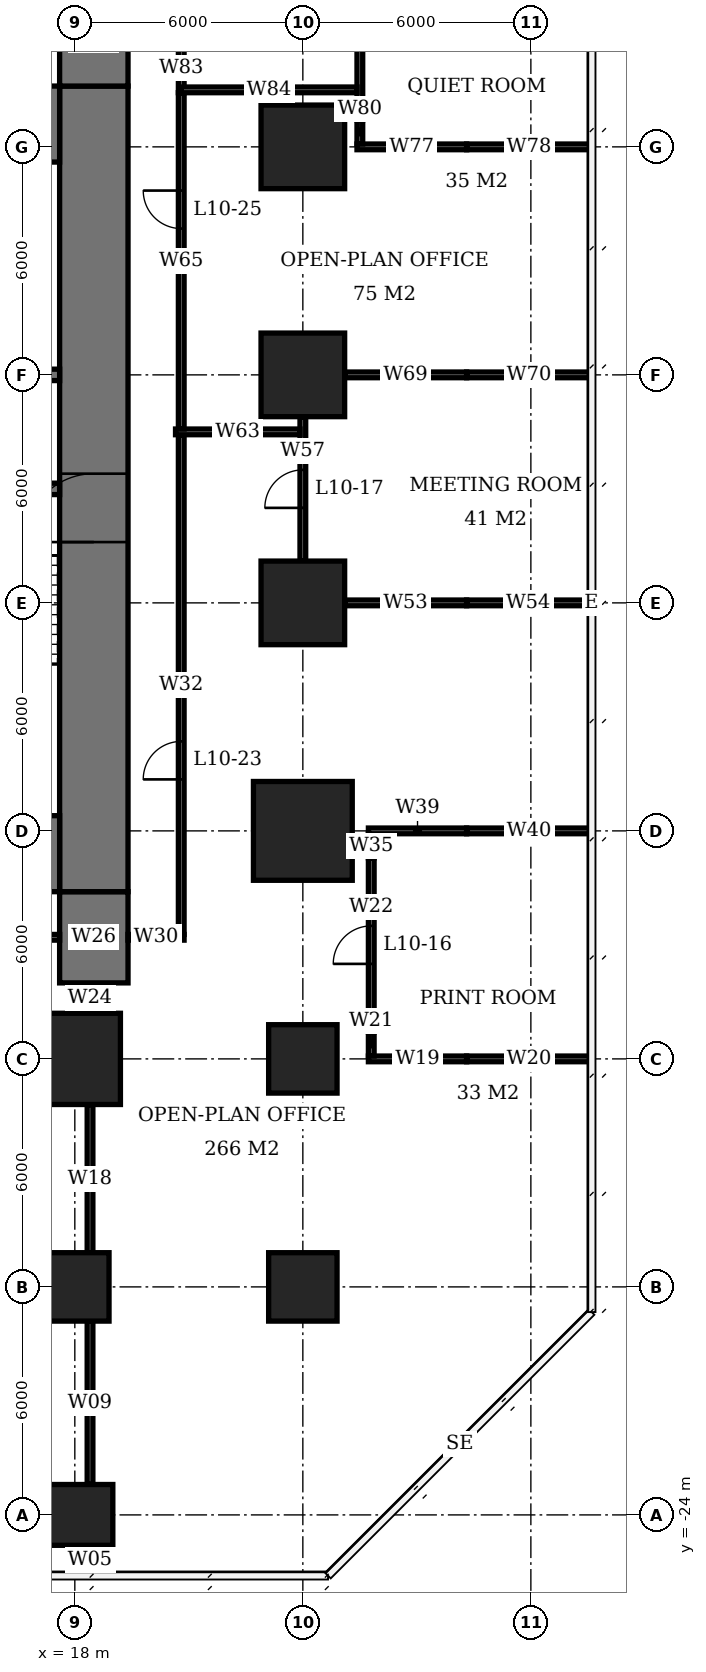
"""IFC4 building model, lengths in metres.
Left out: names, types, materials, properties, quantities, classifications, styles, units other than length and angle.
Written with IfcOpenShell. Run it as: python <this file> out.ifc"""

import sys

from ifc_helpers import new_model, si_unit, direction, frame, frame_2d, origin, origin_2d, place, context, subcontext, project, spatial, rectangle, extrude, element, fill, save


model = new_model("IFC4")
c1 = context("Model", 3, precision=1e-05, world=origin(), true_north=direction((0.0, 1.0)))
c2 = subcontext(c1, "Body", "Model", "MODEL_VIEW")
j1 = project(units=[si_unit("LENGTHUNIT", "METRE"), si_unit("PLANEANGLEUNIT", "RADIAN")], contexts=[c1])
p1 = place(None, origin())
s1 = spatial("IfcSite", under=j1, at=p1, CompositionType="ELEMENT")
p2 = place(p1, origin())
s2 = spatial("IfcBuilding", under=s1, at=p2, CompositionType="ELEMENT")
p3 = place(p2, frame((0.0, 0.0, 45.5)))
s3 = spatial("IfcBuildingStorey", under=s2, at=p3, CompositionType="ELEMENT", Elevation=45.5)
p4 = place(p3, frame((18.0, -24.0, 0.0), z_axis=(0.0, 0.0, 1.0), x_axis=(1.0, 0.0, 0.0)))
e1 = element("IfcColumn", 1, at=p4, inside=s3, PredefinedType="COLUMN", context=c2, shape_type="SweptSolid", body=[
    extrude(rectangle(XDim=2.0, YDim=1.6, at=origin_2d()), origin(), (0.0, 0.0, 1.0), 3.9),
])
p5 = place(p3, frame((18.0, -18.0, 0.0), z_axis=(0.0, 0.0, 1.0), x_axis=(1.0, 0.0, 0.0)))
e2 = element("IfcColumn", 2, at=p5, inside=s3, PredefinedType="COLUMN", context=c2, shape_type="SweptSolid", body=[
    extrude(rectangle(XDim=1.8, YDim=1.8, at=origin_2d()), origin(), (0.0, 0.0, 1.0), 3.9),
])
p6 = place(p3, frame((18.0, -12.0, 0.0), z_axis=(0.0, 0.0, 1.0), x_axis=(1.0, 0.0, 0.0)))
e3 = element("IfcColumn", 3, at=p6, inside=s3, PredefinedType="COLUMN", context=c2, shape_type="SweptSolid", body=[
    extrude(rectangle(XDim=2.4, YDim=2.4, at=origin_2d()), origin(), (0.0, 0.0, 1.0), 3.9),
])
for number, where, z_axis, x_axis in (
    (4, (24.0, -18.0, 0.0), (0.0, 0.0, 1.0), (1.0, 0.0, 0.0)),
    (5, (24.0, -12.0, 0.0), (0.0, 0.0, 1.0), (1.0, 0.0, 0.0)),
):
    element("IfcColumn", number, at=place(p3, frame(where, z_axis=z_axis, x_axis=x_axis)), inside=s3, PredefinedType="COLUMN", context=c2, shape_type="SweptSolid", body=[
        extrude(rectangle(XDim=1.8, YDim=1.8, at=origin_2d()), origin(), (0.0, 0.0, 1.0), 3.9),
    ])
p7 = place(p3, frame((24.0, -6.0, 0.0), z_axis=(0.0, 0.0, 1.0), x_axis=(1.0, 0.0, 0.0)))
e6 = element("IfcColumn", 6, at=p7, inside=s3, PredefinedType="COLUMN", context=c2, shape_type="SweptSolid", body=[
    extrude(rectangle(XDim=2.6, YDim=2.6, at=origin_2d()), origin(), (0.0, 0.0, 1.0), 3.9),
])
for number, where, z_axis, x_axis in (
    (7, (24.0, 0.0, 0.0), (0.0, 0.0, 1.0), (1.0, 0.0, 0.0)),
    (8, (24.0, 6.0, 0.0), (0.0, 0.0, 1.0), (1.0, 0.0, 0.0)),
    (9, (24.0, 12.0, 0.0), (0.0, 0.0, 1.0), (1.0, 0.0, 0.0)),
):
    element("IfcColumn", number, at=place(p3, frame(where, z_axis=z_axis, x_axis=x_axis)), inside=s3, PredefinedType="COLUMN", context=c2, shape_type="SweptSolid", body=[
        extrude(rectangle(XDim=2.2, YDim=2.2, at=origin_2d()), origin(), (0.0, 0.0, 1.0), 3.9),
    ])
for number, where, z_axis, x_axis in (
    (10, (-5.6, -6.6, 0.0), (0.0, 0.0, 1.0), (1.0, 0.0, 0.0)),
    (11, (-5.6, 12.6, 0.0), (0.0, 0.0, 1.0), (1.0, 0.0, 0.0)),
):
    element("IfcWall", number, at=place(p3, frame(where, z_axis=z_axis, x_axis=x_axis)), inside=s3, PredefinedType="SHEAR", context=c2, shape_type="SweptSolid", body=[
        extrude(rectangle(XDim=23.2, YDim=2.0, at=frame_2d((11.6, 0.0))), origin(), (0.0, 0.0, 1.0), 3.9),
    ])
p8 = place(p3, frame((18.5, -7.6, 0.0), z_axis=(0.0, 0.0, 1.0), x_axis=(0.0, 1.0, 0.0)))
e12 = element("IfcWall", 12, at=p8, inside=s3, PredefinedType="SHEAR", context=c2, shape_type="SweptSolid", body=[
    extrude(rectangle(XDim=21.2, YDim=1.8, at=frame_2d((10.6, 0.0))), origin(), (0.0, 0.0, 1.0), 3.9),
])
p9 = place(p8, frame((9.2, 0.0, 0.0)))
e13 = element("IfcOpeningElement", 13, at=p9, cuts=e12, PredefinedType="OPENING", context=c2, shape_type="SweptSolid", body=[
    extrude(rectangle(XDim=1.8, YDim=2.4, at=frame_2d((0.9, 1.2))), frame((0.0, 0.91, 0.0), z_axis=(0.0, -1.0, 0.0), x_axis=(1.0, 0.0, 0.0)), (0.0, 0.0, 1.0), 1.82),
])
for number, where, z_axis, x_axis in (
    (14, (18.5, -10.0, 0.0), (0.0, 0.0, 1.0), (0.0, 1.0, 0.0)),
    (15, (18.5, 13.6, 0.0), (0.0, 0.0, 1.0), (0.0, 1.0, 0.0)),
):
    element("IfcWall", number, at=place(p3, frame(where, z_axis=z_axis, x_axis=x_axis)), inside=s3, PredefinedType="SHEAR", context=c2, shape_type="SweptSolid", body=[
        extrude(rectangle(XDim=2.4, YDim=1.8, at=frame_2d((1.2, 0.0))), origin(), (0.0, 0.0, 1.0), 3.9),
    ])
p10 = place(p3, frame((12.15, 3.0, 0.0), z_axis=(0.0, 0.0, 1.0), x_axis=(1.0, 0.0, 0.0)))
e16 = element("IfcWall", 16, at=p10, inside=s3, PredefinedType="SHEAR", context=c2, shape_type="SweptSolid", body=[
    extrude(rectangle(XDim=5.45, YDim=0.3, at=frame_2d((2.725, 0.0))), origin(), (0.0, 0.0, 1.0), 3.9),
])
p11 = place(p10, frame((3.25, 0.0, 0.0)))
e17 = element("IfcOpeningElement", 17, at=p11, cuts=e16, PredefinedType="OPENING", context=c2, shape_type="SweptSolid", body=[
    extrude(rectangle(XDim=1.2, YDim=2.1, at=frame_2d((0.6, 1.05))), frame((0.0, 0.16, 0.0), z_axis=(0.0, -1.0, 0.0), x_axis=(1.0, 0.0, 0.0)), (0.0, 0.0, 1.0), 0.32),
])
p12 = place(p10, frame((0.45, 0.0, 0.0)))
e18 = element("IfcOpeningElement", 18, at=p12, cuts=e16, PredefinedType="OPENING", context=c2, shape_type="SweptSolid", body=[
    extrude(rectangle(XDim=0.9, YDim=2.1, at=frame_2d((0.45, 1.05))), frame((0.0, 0.16, 0.0), z_axis=(0.0, -1.0, 0.0), x_axis=(1.0, 0.0, 0.0)), (0.0, 0.0, 1.0), 0.32),
])
p13 = place(p3, frame((-0.15, 6.0, 0.0), z_axis=(0.0, 0.0, 1.0), x_axis=(1.0, 0.0, 0.0)))
e19 = element("IfcWall", 19, at=p13, inside=s3, PredefinedType="SHEAR", context=c2, shape_type="SweptSolid", body=[
    extrude(rectangle(XDim=17.75, YDim=0.3, at=frame_2d((8.875, 0.0))), origin(), (0.0, 0.0, 1.0), 3.9),
])
p14 = place(p13, frame((13.15, 0.0, 0.0)))
e20 = element("IfcOpeningElement", 20, at=p14, cuts=e19, PredefinedType="OPENING", context=c2, shape_type="SweptSolid", body=[
    extrude(rectangle(XDim=0.9, YDim=2.1, at=frame_2d((0.45, 1.05))), frame((0.0, 0.16, 0.0), z_axis=(0.0, -1.0, 0.0), x_axis=(1.0, 0.0, 0.0)), (0.0, 0.0, 1.0), 0.32),
])
p15 = place(p13, frame((1.1, 0.0, 0.0)))
e21 = element("IfcOpeningElement", 21, at=p15, cuts=e19, PredefinedType="OPENING", context=c2, shape_type="SweptSolid", body=[
    extrude(rectangle(XDim=1.1, YDim=2.1, at=frame_2d((0.55, 1.05))), frame((0.0, 0.16, 0.0), z_axis=(0.0, -1.0, 0.0), x_axis=(1.0, 0.0, 0.0)), (0.0, 0.0, 1.0), 0.32),
])
p16 = place(p13, frame((4.1, 0.0, 0.0)))
e22 = element("IfcOpeningElement", 22, at=p16, cuts=e19, PredefinedType="OPENING", context=c2, shape_type="SweptSolid", body=[
    extrude(rectangle(XDim=1.1, YDim=2.1, at=frame_2d((0.55, 1.05))), frame((0.0, 0.16, 0.0), z_axis=(0.0, -1.0, 0.0), x_axis=(1.0, 0.0, 0.0)), (0.0, 0.0, 1.0), 0.32),
])
p17 = place(p13, frame((7.1, 0.0, 0.0)))
e23 = element("IfcOpeningElement", 23, at=p17, cuts=e19, PredefinedType="OPENING", context=c2, shape_type="SweptSolid", body=[
    extrude(rectangle(XDim=1.1, YDim=2.1, at=frame_2d((0.55, 1.05))), frame((0.0, 0.16, 0.0), z_axis=(0.0, -1.0, 0.0), x_axis=(1.0, 0.0, 0.0)), (0.0, 0.0, 1.0), 0.32),
])
p18 = place(p13, frame((10.1, 0.0, 0.0)))
e24 = element("IfcOpeningElement", 24, at=p18, cuts=e19, PredefinedType="OPENING", context=c2, shape_type="SweptSolid", body=[
    extrude(rectangle(XDim=1.1, YDim=2.1, at=frame_2d((0.55, 1.05))), frame((0.0, 0.16, 0.0), z_axis=(0.0, -1.0, 0.0), x_axis=(1.0, 0.0, 0.0)), (0.0, 0.0, 1.0), 0.32),
])
p19 = place(p3, frame((25.725, -12.0, 0.0), z_axis=(0.0, 0.0, 1.0), x_axis=(1.0, 0.0, 0.0)))
e25 = element("IfcWall", 25, at=p19, inside=s3, PredefinedType="PARTITIONING", context=c2, shape_type="SweptSolid", body=[
    extrude(rectangle(XDim=2.585, YDim=0.15, at=frame_2d((1.292, 0.0))), origin(), (0.0, 0.0, 1.0), 2.65),
])
p20 = place(p3, frame((28.31, -12.0, 0.0), z_axis=(0.0, 0.0, 1.0), x_axis=(1.0, 0.0, 0.0)))
e26 = element("IfcWall", 26, at=p20, inside=s3, PredefinedType="PARTITIONING", context=c2, shape_type="SweptSolid", body=[
    extrude(rectangle(XDim=3.29, YDim=0.15, at=frame_2d((1.645, 0.0))), origin(), (0.0, 0.0, 1.0), 3.65),
])
p21 = place(p3, frame((25.725, -6.0, 0.0), z_axis=(0.0, 0.0, 1.0), x_axis=(1.0, 0.0, 0.0)))
e27 = element("IfcWall", 27, at=p21, inside=s3, PredefinedType="PARTITIONING", context=c2, shape_type="SweptSolid", body=[
    extrude(rectangle(XDim=2.585, YDim=0.15, at=frame_2d((1.292, 0.0))), origin(), (0.0, 0.0, 1.0), 2.65),
])
p22 = place(p3, frame((28.31, -6.0, 0.0), z_axis=(0.0, 0.0, 1.0), x_axis=(1.0, 0.0, 0.0)))
e28 = element("IfcWall", 28, at=p22, inside=s3, PredefinedType="PARTITIONING", context=c2, shape_type="SweptSolid", body=[
    extrude(rectangle(XDim=3.29, YDim=0.15, at=frame_2d((1.645, 0.0))), origin(), (0.0, 0.0, 1.0), 3.65),
])
p23 = place(p3, frame((25.1, 0.0, 0.0), z_axis=(0.0, 0.0, 1.0), x_axis=(1.0, 0.0, 0.0)))
e29 = element("IfcWall", 29, at=p23, inside=s3, PredefinedType="PARTITIONING", context=c2, shape_type="SweptSolid", body=[
    extrude(rectangle(XDim=3.21, YDim=0.15, at=frame_2d((1.605, 0.0))), origin(), (0.0, 0.0, 1.0), 2.65),
])
p24 = place(p3, frame((28.31, 0.0, 0.0), z_axis=(0.0, 0.0, 1.0), x_axis=(1.0, 0.0, 0.0)))
e30 = element("IfcWall", 30, at=p24, inside=s3, PredefinedType="PARTITIONING", context=c2, shape_type="SweptSolid", body=[
    extrude(rectangle(XDim=3.24, YDim=0.15, at=frame_2d((1.62, 0.0))), origin(), (0.0, 0.0, 1.0), 3.65),
])
p25 = place(p3, frame((25.1, 6.0, 0.0), z_axis=(0.0, 0.0, 1.0), x_axis=(1.0, 0.0, 0.0)))
e31 = element("IfcWall", 31, at=p25, inside=s3, PredefinedType="PARTITIONING", context=c2, shape_type="SweptSolid", body=[
    extrude(rectangle(XDim=3.21, YDim=0.15, at=frame_2d((1.605, 0.0))), origin(), (0.0, 0.0, 1.0), 2.65),
])
p26 = place(p3, frame((28.31, 6.0, 0.0), z_axis=(0.0, 0.0, 1.0), x_axis=(1.0, 0.0, 0.0)))
e32 = element("IfcWall", 32, at=p26, inside=s3, PredefinedType="PARTITIONING", context=c2, shape_type="SweptSolid", body=[
    extrude(rectangle(XDim=3.29, YDim=0.15, at=frame_2d((1.645, 0.0))), origin(), (0.0, 0.0, 1.0), 3.65),
])
p27 = place(p3, frame((25.425, 12.0, 0.0), z_axis=(0.0, 0.0, 1.0), x_axis=(1.0, 0.0, 0.0)))
e33 = element("IfcWall", 33, at=p27, inside=s3, PredefinedType="PARTITIONING", context=c2, shape_type="SweptSolid", body=[
    extrude(rectangle(XDim=2.885, YDim=0.15, at=frame_2d((1.442, 0.0))), origin(), (0.0, 0.0, 1.0), 2.65),
])
p28 = place(p3, frame((28.31, 12.0, 0.0), z_axis=(0.0, 0.0, 1.0), x_axis=(1.0, 0.0, 0.0)))
e34 = element("IfcWall", 34, at=p28, inside=s3, PredefinedType="PARTITIONING", context=c2, shape_type="SweptSolid", body=[
    extrude(rectangle(XDim=3.29, YDim=0.15, at=frame_2d((1.645, 0.0))), origin(), (0.0, 0.0, 1.0), 3.65),
])
p29 = place(p3, frame((24.0, 1.1, 0.0), z_axis=(0.0, 0.0, 1.0), x_axis=(0.0, 1.0, 0.0)))
e35 = element("IfcWall", 35, at=p29, inside=s3, PredefinedType="PARTITIONING", context=c2, shape_type="SweptSolid", body=[
    extrude(rectangle(XDim=3.8, YDim=0.15, at=frame_2d((1.9, 0.0))), origin(), (0.0, 0.0, 1.0), 3.65),
])
p30 = place(p29, frame((1.4, 0.0, 0.0)))
e36 = element("IfcOpeningElement", 36, at=p30, cuts=e35, PredefinedType="OPENING", context=c2, shape_type="SweptSolid", body=[
    extrude(rectangle(XDim=1.0, YDim=2.1, at=frame_2d((0.5, 1.05))), frame((0.0, 0.085, 0.0), z_axis=(0.0, -1.0, 0.0), x_axis=(1.0, 0.0, 0.0)), (0.0, 0.0, 1.0), 0.17),
])
p31 = place(p3, frame((25.5, 12.075, 0.0), z_axis=(0.0, 0.0, 1.0), x_axis=(0.0, 1.0, 0.0)))
e37 = element("IfcWall", 37, at=p31, inside=s3, PredefinedType="PARTITIONING", context=c2, shape_type="SweptSolid", body=[
    extrude(rectangle(XDim=0.635, YDim=0.15, at=frame_2d((0.317, 0.0))), origin(), (0.0, 0.0, 1.0), 2.65),
])
p32 = place(p3, frame((25.5, 12.71, 0.0), z_axis=(0.0, 0.0, 1.0), x_axis=(0.0, 1.0, 0.0)))
e38 = element("IfcWall", 38, at=p32, inside=s3, PredefinedType="PARTITIONING", context=c2, shape_type="SweptSolid", body=[
    extrude(rectangle(XDim=4.78, YDim=0.15, at=frame_2d((2.39, 0.0))), origin(), (0.0, 0.0, 1.0), 3.65),
])
p33 = place(p32, frame((1.89, 0.0, 0.0)))
e39 = element("IfcOpeningElement", 39, at=p33, cuts=e38, PredefinedType="OPENING", context=c2, shape_type="SweptSolid", body=[
    extrude(rectangle(XDim=1.0, YDim=2.1, at=frame_2d((0.5, 1.05))), frame((0.0, 0.085, 0.0), z_axis=(0.0, -1.0, 0.0), x_axis=(1.0, 0.0, 0.0)), (0.0, 0.0, 1.0), 0.17),
])
p34 = place(p3, frame((25.8, -11.925, 0.0), z_axis=(0.0, 0.0, 1.0), x_axis=(0.0, 1.0, 0.0)))
e40 = element("IfcWall", 40, at=p34, inside=s3, PredefinedType="PARTITIONING", context=c2, shape_type="SweptSolid", body=[
    extrude(rectangle(XDim=0.635, YDim=0.15, at=frame_2d((0.317, 0.0))), origin(), (0.0, 0.0, 1.0), 2.65),
])
p35 = place(p3, frame((25.8, -11.29, 0.0), z_axis=(0.0, 0.0, 1.0), x_axis=(0.0, 1.0, 0.0)))
e41 = element("IfcWall", 41, at=p35, inside=s3, PredefinedType="PARTITIONING", context=c2, shape_type="SweptSolid", body=[
    extrude(rectangle(XDim=4.58, YDim=0.15, at=frame_2d((2.29, 0.0))), origin(), (0.0, 0.0, 1.0), 3.65),
])
p36 = place(p35, frame((1.79, 0.0, 0.0)))
e42 = element("IfcOpeningElement", 42, at=p36, cuts=e41, PredefinedType="OPENING", context=c2, shape_type="SweptSolid", body=[
    extrude(rectangle(XDim=1.0, YDim=2.1, at=frame_2d((0.5, 1.05))), frame((0.0, 0.085, 0.0), z_axis=(0.0, -1.0, 0.0), x_axis=(1.0, 0.0, 0.0)), (0.0, 0.0, 1.0), 0.17),
])
p37 = place(p3, frame((25.8, -6.71, 0.0), z_axis=(0.0, 0.0, 1.0), x_axis=(0.0, 1.0, 0.0)))
e43 = element("IfcWall", 43, at=p37, inside=s3, PredefinedType="PARTITIONING", context=c2, shape_type="SweptSolid", body=[
    extrude(rectangle(XDim=0.635, YDim=0.15, at=frame_2d((0.317, 0.0))), origin(), (0.0, 0.0, 1.0), 2.65),
])
p38 = place(p3, frame((4.575, -8.8, 0.0), z_axis=(0.0, 0.0, 1.0), x_axis=(1.0, 0.0, 0.0)))
e44 = element("IfcWall", 44, at=p38, inside=s3, PredefinedType="PARTITIONING", context=c2, shape_type="SweptSolid", body=[
    extrude(rectangle(XDim=13.025, YDim=0.15, at=frame_2d((6.513, 0.0))), origin(), (0.0, 0.0, 1.0), 3.65),
])
p39 = place(p38, frame((4.01, 0.0, 0.0)))
e45 = element("IfcOpeningElement", 45, at=p39, cuts=e44, PredefinedType="OPENING", context=c2, shape_type="SweptSolid", body=[
    extrude(rectangle(XDim=1.0, YDim=2.1, at=frame_2d((0.5, 1.05))), frame((0.0, 0.085, 0.0), z_axis=(0.0, -1.0, 0.0), x_axis=(1.0, 0.0, 0.0)), (0.0, 0.0, 1.0), 0.17),
])
p40 = place(p3, frame((18.4, -25.55, 0.0), z_axis=(0.0, 0.0, 1.0), x_axis=(0.0, 1.0, 0.0)))
e46 = element("IfcWall", 46, at=p40, inside=s3, PredefinedType="PARTITIONING", context=c2, shape_type="SweptSolid", body=[
    extrude(rectangle(XDim=0.75, YDim=0.15, at=frame_2d((0.375, 0.0))), origin(), (0.0, 0.0, 1.0), 3.65),
])
p41 = place(p3, frame((18.4, -23.2, 0.0), z_axis=(0.0, 0.0, 1.0), x_axis=(0.0, 1.0, 0.0)))
e47 = element("IfcWall", 47, at=p41, inside=s3, PredefinedType="PARTITIONING", context=c2, shape_type="SweptSolid", body=[
    extrude(rectangle(XDim=4.3, YDim=0.15, at=frame_2d((2.15, 0.0))), origin(), (0.0, 0.0, 1.0), 3.65),
])
p42 = place(p3, frame((18.4, -17.1, 0.0), z_axis=(0.0, 0.0, 1.0), x_axis=(0.0, 1.0, 0.0)))
e48 = element("IfcWall", 48, at=p42, inside=s3, PredefinedType="PARTITIONING", context=c2, shape_type="SweptSolid", body=[
    extrude(rectangle(XDim=3.9, YDim=0.15, at=frame_2d((1.95, 0.0))), origin(), (0.0, 0.0, 1.0), 3.65),
])
p43 = place(p3, frame((18.4, -10.8, 0.0), z_axis=(0.0, 0.0, 1.0), x_axis=(0.0, 1.0, 0.0)))
e49 = element("IfcWall", 49, at=p43, inside=s3, PredefinedType="PARTITIONING", context=c2, shape_type="SweptSolid", body=[
    extrude(rectangle(XDim=0.8, YDim=0.15, at=frame_2d((0.4, 0.0))), origin(), (0.0, 0.0, 1.0), 3.65),
])
p44 = place(p3, frame((19.4, -8.8, 0.0), z_axis=(0.0, 0.0, 1.0), x_axis=(1.0, 0.0, 0.0)))
e50 = element("IfcWall", 50, at=p44, inside=s3, PredefinedType="PARTITIONING", context=c2, shape_type="SweptSolid", body=[
    extrude(rectangle(XDim=1.475, YDim=0.15, at=frame_2d((0.738, 0.0))), origin(), (0.0, 0.0, 1.0), 3.65),
])
p45 = place(p3, frame((20.8, -8.725, 0.0), z_axis=(0.0, 0.0, 1.0), x_axis=(0.0, 1.0, 0.0)))
e51 = element("IfcWall", 51, at=p45, inside=s3, PredefinedType="PARTITIONING", context=c2, shape_type="SweptSolid", body=[
    extrude(rectangle(XDim=13.15, YDim=0.15, at=frame_2d((6.575, 0.0))), origin(), (0.0, 0.0, 1.0), 3.65),
])
p46 = place(p45, frame((4.08, 0.0, 0.0)))
e52 = element("IfcOpeningElement", 52, at=p46, cuts=e51, PredefinedType="OPENING", context=c2, shape_type="SweptSolid", body=[
    extrude(rectangle(XDim=1.0, YDim=2.1, at=frame_2d((0.5, 1.05))), frame((0.0, 0.085, 0.0), z_axis=(0.0, -1.0, 0.0), x_axis=(1.0, 0.0, 0.0)), (0.0, 0.0, 1.0), 0.17),
])
p47 = place(p3, frame((20.8, 4.575, 0.0), z_axis=(0.0, 0.0, 1.0), x_axis=(0.0, 1.0, 0.0)))
e53 = element("IfcWall", 53, at=p47, inside=s3, PredefinedType="PARTITIONING", context=c2, shape_type="SweptSolid", body=[
    extrude(rectangle(XDim=8.85, YDim=0.15, at=frame_2d((4.425, 0.0))), origin(), (0.0, 0.0, 1.0), 3.65),
])
p48 = place(p47, frame((5.275, 0.0, 0.0)))
e54 = element("IfcOpeningElement", 54, at=p48, cuts=e53, PredefinedType="OPENING", context=c2, shape_type="SweptSolid", body=[
    extrude(rectangle(XDim=1.0, YDim=2.1, at=frame_2d((0.5, 1.05))), frame((0.0, 0.085, 0.0), z_axis=(0.0, -1.0, 0.0), x_axis=(1.0, 0.0, 0.0)), (0.0, 0.0, 1.0), 0.17),
])
p49 = place(p3, frame((20.65, 4.5, 0.0), z_axis=(0.0, 0.0, 1.0), x_axis=(1.0, 0.0, 0.0)))
e55 = element("IfcWall", 55, at=p49, inside=s3, PredefinedType="PARTITIONING", context=c2, shape_type="SweptSolid", body=[
    extrude(rectangle(XDim=3.275, YDim=0.15, at=frame_2d((1.638, 0.0))), origin(), (0.0, 0.0, 1.0), 3.65),
])
p50 = place(p3, frame((20.8, 13.425, 0.0), z_axis=(0.0, 0.0, 1.0), x_axis=(0.0, 1.0, 0.0)))
e56 = element("IfcWall", 56, at=p50, inside=s3, PredefinedType="PARTITIONING", context=c2, shape_type="SweptSolid", body=[
    extrude(rectangle(XDim=1.3, YDim=0.15, at=frame_2d((0.65, 0.0))), origin(), (0.0, 0.0, 1.0), 3.65),
])
p51 = place(p3, frame((20.8, 13.5, 0.0), z_axis=(0.0, 0.0, 1.0), x_axis=(1.0, 0.0, 0.0)))
e57 = element("IfcWall", 57, at=p51, inside=s3, PredefinedType="PARTITIONING", context=c2, shape_type="SweptSolid", body=[
    extrude(rectangle(XDim=4.625, YDim=0.15, at=frame_2d((2.312, 0.0))), origin(), (0.0, 0.0, 1.0), 3.65),
])
p52 = place(p9, origin())
e58 = element("IfcDoor", 58, at=p52, inside=s3, OperationType="DOUBLE_DOOR_SINGLE_SWING", PredefinedType="DOOR", context=c2, shape_type="SweptSolid", body=[
    extrude(rectangle(XDim=1.8, YDim=2.4, at=frame_2d((0.9, 1.2))), frame((0.0, 0.025, 0.0), z_axis=(0.0, -1.0, 0.0), x_axis=(1.0, 0.0, 0.0)), (0.0, 0.0, 1.0), 0.05),
])
fill(e13, e58)
p53 = place(p36, origin())
e59 = element("IfcDoor", 59, at=p53, inside=s3, OperationType="SINGLE_SWING_LEFT", PredefinedType="DOOR", context=c2, shape_type="SweptSolid", body=[
    extrude(rectangle(XDim=1.0, YDim=2.1, at=frame_2d((0.5, 1.05))), frame((0.0, 0.025, 0.0), z_axis=(0.0, -1.0, 0.0), x_axis=(1.0, 0.0, 0.0)), (0.0, 0.0, 1.0), 0.05),
])
fill(e42, e59)
p54 = place(p30, origin())
e60 = element("IfcDoor", 60, at=p54, inside=s3, OperationType="SINGLE_SWING_LEFT", PredefinedType="DOOR", context=c2, shape_type="SweptSolid", body=[
    extrude(rectangle(XDim=1.0, YDim=2.1, at=frame_2d((0.5, 1.05))), frame((0.0, 0.025, 0.0), z_axis=(0.0, -1.0, 0.0), x_axis=(1.0, 0.0, 0.0)), (0.0, 0.0, 1.0), 0.05),
])
fill(e36, e60)
p55 = place(p46, origin())
e61 = element("IfcDoor", 61, at=p55, inside=s3, OperationType="SINGLE_SWING_LEFT", PredefinedType="DOOR", context=c2, shape_type="SweptSolid", body=[
    extrude(rectangle(XDim=1.0, YDim=2.1, at=frame_2d((0.5, 1.05))), frame((0.0, 0.025, 0.0), z_axis=(0.0, -1.0, 0.0), x_axis=(1.0, 0.0, 0.0)), (0.0, 0.0, 1.0), 0.05),
])
fill(e52, e61)
p56 = place(p48, origin())
e62 = element("IfcDoor", 62, at=p56, inside=s3, OperationType="SINGLE_SWING_RIGHT", PredefinedType="DOOR", context=c2, shape_type="SweptSolid", body=[
    extrude(rectangle(XDim=1.0, YDim=2.1, at=frame_2d((0.5, 1.05))), frame((0.0, 0.025, 0.0), z_axis=(0.0, -1.0, 0.0), x_axis=(1.0, 0.0, 0.0)), (0.0, 0.0, 1.0), 0.05),
])
fill(e54, e62)
save(model, sys.argv[1])
